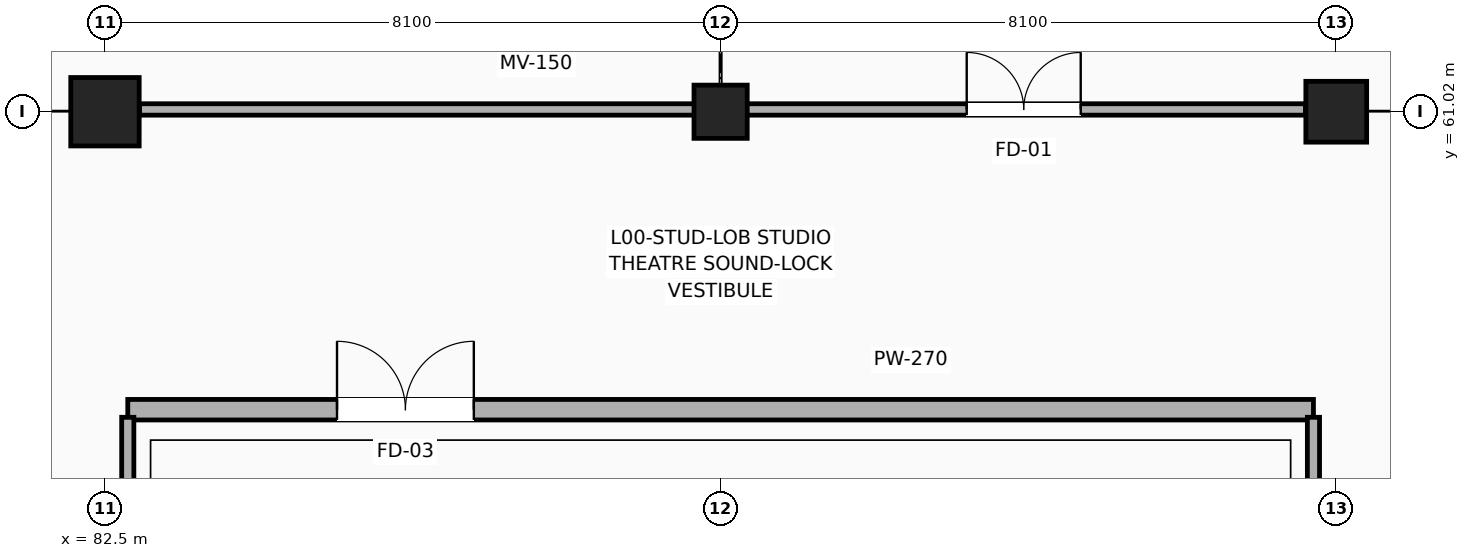
"""IFC4 building model, lengths in metres.
Left out: names, types, materials, properties, quantities, classifications, styles, units other than length and angle.
Written with IfcOpenShell. Run it as: python <this file> out.ifc"""

import sys

from ifc_helpers import new_model, si_unit, direction, frame, frame_2d, origin, origin_2d, place, context, subcontext, project, spatial, rectangle, extrude, element, fill, save


model = new_model("IFC4")
c1 = context("Model", 3, precision=1e-05, world=origin(), true_north=direction((0.0, 1.0)))
c2 = subcontext(c1, "Body", "Model", "MODEL_VIEW")
j1 = project(units=[si_unit("LENGTHUNIT", "METRE"), si_unit("PLANEANGLEUNIT", "RADIAN")], contexts=[c1])
p1 = place(None, origin())
s1 = spatial("IfcSite", under=j1, at=p1, CompositionType="ELEMENT")
p2 = place(p1, origin())
s2 = spatial("IfcBuilding", under=s1, at=p2, CompositionType="ELEMENT")
p3 = place(p2, origin())
s3 = spatial("IfcBuildingStorey", under=s2, at=p3, CompositionType="ELEMENT", Elevation=0.0)
p4 = place(p3, frame((82.5, 61.02, 0.0), z_axis=(0.0, 0.0, 1.0), x_axis=(1.0, 0.0, 0.0)))
e1 = element("IfcColumn", 1, at=p4, inside=s3, PredefinedType="COLUMN", context=c2, shape_type="SweptSolid", body=[
    extrude(rectangle(XDim=0.9, YDim=0.9, at=origin_2d()), origin(), (0.0, 0.0, 1.0), 5.4),
])
p5 = place(p3, frame((90.6, 61.02, 0.0), z_axis=(0.0, 0.0, 1.0), x_axis=(1.0, 0.0, 0.0)))
e2 = element("IfcColumn", 2, at=p5, inside=s3, PredefinedType="COLUMN", context=c2, shape_type="SweptSolid", body=[
    extrude(rectangle(XDim=0.7, YDim=0.7, at=origin_2d()), origin(), (0.0, 0.0, 1.0), 5.4),
])
p6 = place(p3, frame((98.7, 61.02, 0.0), z_axis=(0.0, 0.0, 1.0), x_axis=(1.0, 0.0, 0.0)))
e3 = element("IfcColumn", 3, at=p6, inside=s3, PredefinedType="COLUMN", context=c2, shape_type="SweptSolid", body=[
    extrude(rectangle(XDim=0.8, YDim=0.8, at=origin_2d()), origin(), (0.0, 0.0, 1.0), 5.4),
])
p7 = place(p3, frame((82.8, 57.1, 0.0), z_axis=(0.0, 0.0, 1.0), x_axis=(1.0, 0.0, 0.0)))
e4 = element("IfcWall", 4, at=p7, inside=s3, PredefinedType="SOLIDWALL", context=c2, shape_type="SweptSolid", body=[
    extrude(rectangle(XDim=15.6, YDim=0.27, at=frame_2d((7.8, 0.0))), origin(), (0.0, 0.0, 1.0), 5.085),
])
p8 = place(p7, frame((2.753, 0.0, 0.0)))
e5 = element("IfcOpeningElement", 5, at=p8, cuts=e4, PredefinedType="OPENING", context=c2, shape_type="SweptSolid", body=[
    extrude(rectangle(XDim=1.8, YDim=2.4, at=frame_2d((0.9, 1.2))), frame((0.0, 0.145, 0.0), z_axis=(0.0, -1.0, 0.0), x_axis=(1.0, 0.0, 0.0)), (0.0, 0.0, 1.0), 0.29),
])
p9 = place(p3, frame((82.955, 61.05, 0.0), z_axis=(0.0, 0.0, 1.0), x_axis=(1.0, 0.0, 0.0)))
e6 = element("IfcWall", 6, at=p9, inside=s3, PredefinedType="MOVABLE", context=c2, shape_type="SweptSolid", body=[
    extrude(rectangle(XDim=15.34, YDim=0.15, at=frame_2d((7.67, 0.0))), origin(), (0.0, 0.0, 1.0), 4.137),
])
p10 = place(p9, frame((10.883, 0.0, 0.0)))
e7 = element("IfcOpeningElement", 7, at=p10, cuts=e6, PredefinedType="OPENING", context=c2, shape_type="SweptSolid", body=[
    extrude(rectangle(XDim=1.5, YDim=2.2, at=frame_2d((0.75, 1.1))), frame((0.0, 0.085, 0.0), z_axis=(0.0, -1.0, 0.0), x_axis=(1.0, 0.0, 0.0)), (0.0, 0.0, 1.0), 0.17),
])
for number, where, z_axis, x_axis in (
    (8, (82.8, 33.8, 0.0), (0.0, 0.0, 1.0), (0.0, 1.0, 0.0)),
    (9, (98.4, 33.8, 0.0), (0.0, 0.0, 1.0), (0.0, 1.0, 0.0)),
):
    element("IfcWall", number, at=place(p3, frame(where, z_axis=z_axis, x_axis=x_axis)), inside=s3, PredefinedType="PARTITIONING", context=c2, shape_type="SweptSolid", body=[
        extrude(rectangle(XDim=23.2, YDim=0.16, at=frame_2d((11.6, 0.0))), origin(), (0.0, 0.0, 1.0), 5.085),
    ])
p11 = place(p8, origin())
e10 = element("IfcDoor", 10, at=p11, inside=s3, OperationType="DOUBLE_DOOR_SINGLE_SWING", PredefinedType="DOOR", context=c2, shape_type="SweptSolid", body=[
    extrude(rectangle(XDim=1.8, YDim=2.4, at=frame_2d((0.9, 1.2))), frame((0.0, 0.025, 0.0), z_axis=(0.0, -1.0, 0.0), x_axis=(1.0, 0.0, 0.0)), (0.0, 0.0, 1.0), 0.05),
])
fill(e5, e10)
p12 = place(p10, origin())
e11 = element("IfcDoor", 11, at=p12, inside=s3, OperationType="DOUBLE_DOOR_SINGLE_SWING", PredefinedType="DOOR", context=c2, shape_type="SweptSolid", body=[
    extrude(rectangle(XDim=1.5, YDim=2.2, at=frame_2d((0.75, 1.1))), frame((0.0, 0.025, 0.0), z_axis=(0.0, -1.0, 0.0), x_axis=(1.0, 0.0, 0.0)), (0.0, 0.0, 1.0), 0.05),
])
fill(e7, e11)
save(model, sys.argv[1])
